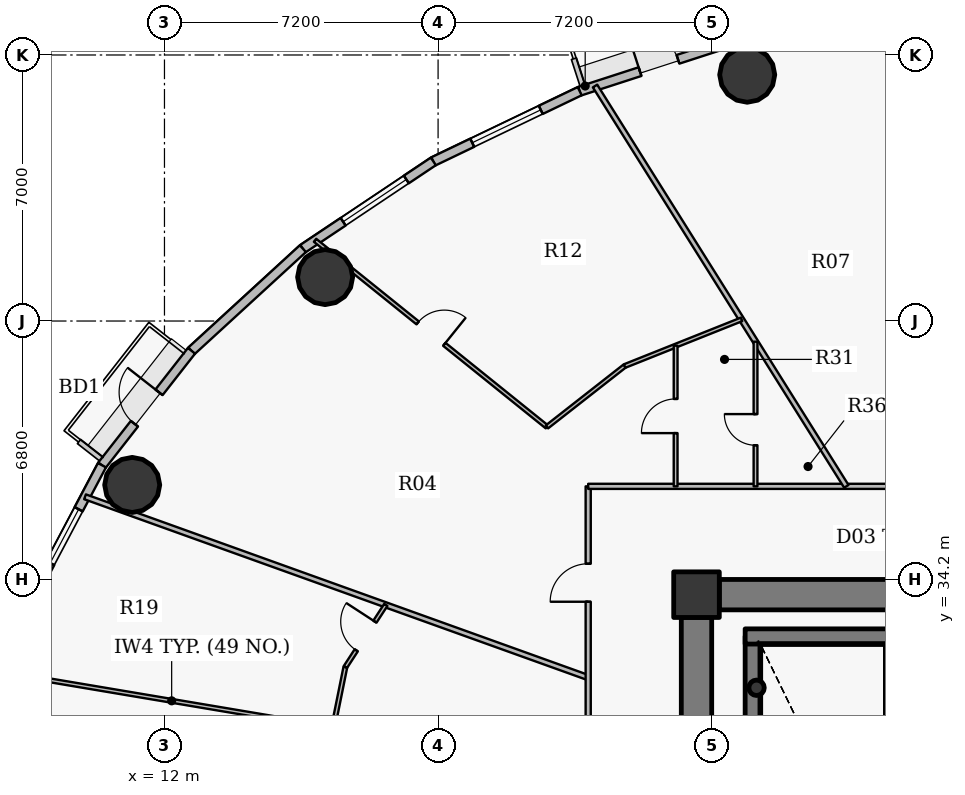
"""IFC4 building model, lengths in metres.
Left out: names, types, materials, properties, quantities, classifications, styles, units other than length and angle.
Written with IfcOpenShell. Run it as: python <this file> out.ifc"""

import sys

from ifc_helpers import new_model, si_unit, direction, frame, frame_2d, origin, origin_2d, place, context, subcontext, project, spatial, rectangle, hollow_circle, extrude, source, transform, mapped, element, fill, save


model = new_model("IFC4")
c1 = context("Model", 3, precision=1e-05, world=origin(), true_north=direction((0.0, 1.0)))
c2 = subcontext(c1, "Body", "Model", "MODEL_VIEW")
j1 = project(units=[si_unit("LENGTHUNIT", "METRE"), si_unit("PLANEANGLEUNIT", "RADIAN")], contexts=[c1])
p1 = place(None, origin())
s1 = spatial("IfcSite", under=j1, at=p1, CompositionType="ELEMENT")
p2 = place(p1, origin())
s2 = spatial("IfcBuilding", under=s1, at=p2, CompositionType="ELEMENT")
p3 = place(p2, frame((0.0, 0.0, 119.7)))
s3 = spatial("IfcBuildingStorey", under=s2, at=p3, CompositionType="ELEMENT", Elevation=119.7)
p4 = place(p3, frame((26.0, 33.8, 0.0), z_axis=(0.0, 0.0, 1.0), x_axis=(1.0, 0.0, 0.0)))
e1 = element("IfcColumn", 1, at=p4, inside=s3, PredefinedType="COLUMN", context=c2, shape_type="SweptSolid", body=[
    extrude(rectangle(XDim=1.2, YDim=1.2, at=origin_2d()), origin(), (0.0, 0.0, 1.0), 3.75),
])
p5 = place(p3, frame((27.48, 24.1, 0.0), z_axis=(0.0, 0.0, 1.0), x_axis=(0.0, 1.0, 0.0)))
e2 = element("IfcWall", 2, at=p5, inside=s3, PredefinedType="SHEAR", context=c2, shape_type="SweptSolid", body=[
    extrude(rectangle(XDim=8.6, YDim=0.4, at=frame_2d((4.3, 0.0))), origin(), (0.0, 0.0, 1.0), 3.75),
])
p6 = place(p3, frame((27.28, 32.7, 0.0), z_axis=(0.0, 0.0, 1.0), x_axis=(1.0, 0.0, 0.0)))
e3 = element("IfcWall", 3, at=p6, inside=s3, PredefinedType="SHEAR", context=c2, shape_type="SweptSolid", body=[
    extrude(rectangle(XDim=4.1, YDim=0.4, at=frame_2d((2.05, 0.0))), origin(), (0.0, 0.0, 1.0), 3.75),
])
p7 = place(p3, frame((27.58, 31.35, 0.0), z_axis=(0.0, 0.0, 1.0), x_axis=(1.0, 0.0, 0.0)))
e4 = element("IfcColumn", 4, at=p7, inside=s3, PredefinedType="COLUMN", context=c2, shape_type="SweptSolid", body=[
    extrude(hollow_circle(Radius=0.203, WallThickness=0.016, at=origin_2d()), origin(), (0.0, 0.0, 1.0), 3.75),
])
p8 = place(p3, frame((26.6, 33.8, 0.0), z_axis=(0.0, 0.0, 1.0), x_axis=(1.0, 0.0, 0.0)))
e5 = element("IfcWall", 5, at=p8, inside=s3, PredefinedType="SHEAR", context=c2, shape_type="SweptSolid", body=[
    extrude(rectangle(XDim=18.8, YDim=0.8, at=frame_2d((9.4, 0.0))), origin(), (0.0, 0.0, 1.0), 2.95),
])
p9 = place(p3, frame((26.0, 20.8, 0.0), z_axis=(0.0, 0.0, 1.0), x_axis=(0.0, 1.0, 0.0)))
e6 = element("IfcWall", 6, at=p9, inside=s3, PredefinedType="SHEAR", context=c2, shape_type="SweptSolid", body=[
    extrude(rectangle(XDim=12.4, YDim=0.8, at=frame_2d((6.2, 0.0))), origin(), (0.0, 0.0, 1.0), 2.95),
])
p10 = place(p9, frame((5.79, 0.0, 0.0)))
e7 = element("IfcOpeningElement", 7, at=p10, cuts=e6, PredefinedType="OPENING", context=c2, shape_type="SweptSolid", body=[
    extrude(rectangle(XDim=0.82, YDim=2.1, at=origin_2d()), frame((0.41, 0.41, 1.05), z_axis=(0.0, -1.0, 0.0), x_axis=(1.0, 0.0, 0.0)), (0.0, 0.0, 1.0), 0.82),
])
for number, where, z_axis, x_axis in (
    (8, (27.334, 47.481, 0.0), (0.0, 0.0, 1.0), (1.0, 0.0, 0.0)),
    (9, (16.227, 42.156, 0.0), (0.0, 0.0, 1.0), (1.0, 0.0, 0.0)),
    (10, (11.151, 36.688, 0.0), (0.0, 0.0, 1.0), (1.0, 0.0, 0.0)),
):
    element("IfcColumn", number, at=place(p3, frame(where, z_axis=z_axis, x_axis=x_axis)), inside=s3, PredefinedType="COLUMN", context=c2, shape_type="SweptSolid", body=[
        extrude(hollow_circle(Radius=0.725, WallThickness=0.042, at=origin_2d()), origin(), (0.0, 0.0, 1.0), 3.75),
    ])
p11 = place(p3, frame((22.926, 47.047, 0.0), z_axis=(0.0, 0.0, 1.0), x_axis=(0.951211346073, 0.308540070495, 0.0)))
e11 = element("IfcWall", 11, at=p11, inside=s3, PredefinedType="SOLIDWALL", context=c2, shape_type="SweptSolid", body=[
    extrude(rectangle(XDim=4.388, YDim=0.24, at=frame_2d((2.194, 0.0))), origin(), (0.0, 0.0, 1.0), 3.5),
])
p12 = place(p11, frame((1.669, 0.0, 0.0)))
e12 = element("IfcOpeningElement", 12, at=p12, cuts=e11, PredefinedType="OPENING", context=c2, shape_type="SweptSolid", body=[
    extrude(rectangle(XDim=1.05, YDim=2.15, at=origin_2d()), frame((0.525, 0.13, 1.075), z_axis=(0.0, -1.0, 0.0), x_axis=(1.0, 0.0, 0.0)), (0.0, 0.0, 1.0), 0.26),
])
p13 = place(p3, frame((19.075, 45.199, 0.0), z_axis=(0.0, 0.0, 1.0), x_axis=(0.901589935876, 0.432591709962, 0.0)))
e13 = element("IfcWall", 13, at=p13, inside=s3, PredefinedType="SOLIDWALL", context=c2, shape_type="SweptSolid", body=[
    extrude(rectangle(XDim=4.272, YDim=0.24, at=frame_2d((2.136, 0.0))), origin(), (0.0, 0.0, 1.0), 3.5),
])
p14 = place(p13, frame((1.136, 0.0, 0.9)))
e14 = element("IfcOpeningElement", 14, at=p14, cuts=e13, PredefinedType="OPENING", context=c2, shape_type="SweptSolid", body=[
    extrude(rectangle(XDim=2.0, YDim=1.75, at=origin_2d()), frame((1.0, 0.13, 0.875), z_axis=(0.0, -1.0, 0.0), x_axis=(1.0, 0.0, 0.0)), (0.0, 0.0, 1.0), 0.26),
])
p15 = place(p3, frame((15.642, 42.903, 0.0), z_axis=(0.0, 0.0, 1.0), x_axis=(0.831221811447, 0.555940914284, 0.0)))
e15 = element("IfcWall", 15, at=p15, inside=s3, PredefinedType="SOLIDWALL", context=c2, shape_type="SweptSolid", body=[
    extrude(rectangle(XDim=4.13, YDim=0.24, at=frame_2d((2.065, 0.0))), origin(), (0.0, 0.0, 1.0), 3.5),
])
p16 = place(p15, frame((1.276, 0.0, 0.9)))
e16 = element("IfcOpeningElement", 16, at=p16, cuts=e15, PredefinedType="OPENING", context=c2, shape_type="SweptSolid", body=[
    extrude(rectangle(XDim=2.0, YDim=1.75, at=origin_2d()), frame((1.0, 0.13, 0.875), z_axis=(0.0, -1.0, 0.0), x_axis=(1.0, 0.0, 0.0)), (0.0, 0.0, 1.0), 0.26),
])
p17 = place(p3, frame((12.711, 40.217, 0.0), z_axis=(0.0, 0.0, 1.0), x_axis=(0.737113356241, 0.675769117414, 0.0)))
e17 = element("IfcWall", 17, at=p17, inside=s3, PredefinedType="SOLIDWALL", context=c2, shape_type="SweptSolid", body=[
    extrude(rectangle(XDim=3.976, YDim=0.24, at=frame_2d((1.988, 0.0))), origin(), (0.0, 0.0, 1.0), 3.5),
])
p18 = place(p3, frame((10.355, 37.206, 0.0), z_axis=(0.0, 0.0, 1.0), x_axis=(0.616272103517, 0.787533297345, 0.0)))
e18 = element("IfcWall", 18, at=p18, inside=s3, PredefinedType="SOLIDWALL", context=c2, shape_type="SweptSolid", body=[
    extrude(rectangle(XDim=3.823, YDim=0.24, at=frame_2d((1.912, 0.0))), origin(), (0.0, 0.0, 1.0), 3.5),
])
p19 = place(p18, frame((1.387, 0.0, 0.0)))
e19 = element("IfcOpeningElement", 19, at=p19, cuts=e18, PredefinedType="OPENING", context=c2, shape_type="SweptSolid", body=[
    extrude(rectangle(XDim=1.05, YDim=2.15, at=origin_2d()), frame((0.525, 0.13, 1.075), z_axis=(0.0, -1.0, 0.0), x_axis=(1.0, 0.0, 0.0)), (0.0, 0.0, 1.0), 0.26),
])
p20 = place(p3, frame((8.63, 33.945, 0.0), z_axis=(0.0, 0.0, 1.0), x_axis=(0.467614004126, 0.883932770716, 0.0)))
e20 = element("IfcWall", 20, at=p20, inside=s3, PredefinedType="SOLIDWALL", context=c2, shape_type="SweptSolid", body=[
    extrude(rectangle(XDim=3.689, YDim=0.24, at=frame_2d((1.844, 0.0))), origin(), (0.0, 0.0, 1.0), 3.5),
])
p21 = place(p20, frame((0.778, 0.0, 0.9)))
e21 = element("IfcOpeningElement", 21, at=p21, cuts=e20, PredefinedType="OPENING", context=c2, shape_type="SweptSolid", body=[
    extrude(rectangle(XDim=1.6, YDim=1.75, at=origin_2d()), frame((0.8, 0.13, 0.875), z_axis=(0.0, -1.0, 0.0), x_axis=(1.0, 0.0, 0.0)), (0.0, 0.0, 1.0), 0.26),
])
p22 = place(p3, frame((7.943, 31.721, 0.0), z_axis=(0.0, 0.0, 1.0), x_axis=(0.986139151265, -0.165920385556, 0.0)))
e22 = element("IfcWall", 22, at=p22, inside=s3, PredefinedType="PARTITIONING", context=c2, shape_type="SweptSolid", body=[
    extrude(rectangle(XDim=8.612, YDim=0.1, at=frame_2d((4.306, 0.0))), origin(), (0.0, 0.0, 1.0), 2.935),
])
p23 = place(p3, frame((9.91, 36.375, 0.0), z_axis=(0.0, 0.0, 1.0), x_axis=(0.941089213164, -0.338158384292, 0.0)))
e23 = element("IfcWall", 23, at=p23, inside=s3, PredefinedType="PARTITIONING", context=c2, shape_type="SweptSolid", body=[
    extrude(rectangle(XDim=14.069, YDim=0.135, at=frame_2d((7.035, 0.0))), origin(), (0.0, 0.0, 1.0), 2.935),
])
p24 = place(p3, frame((15.945, 27.865, 0.0), z_axis=(0.0, 0.0, 1.0), x_axis=(0.198216891741, 0.980158183065, 0.0)))
e24 = element("IfcWall", 24, at=p24, inside=s3, PredefinedType="PARTITIONING", context=c2, shape_type="SweptSolid", body=[
    extrude(rectangle(XDim=4.111, YDim=0.1, at=frame_2d((2.056, 0.0))), origin(), (0.0, 0.0, 1.0), 3.5),
])
p25 = place(p3, frame((15.963, 43.124, 0.0), z_axis=(0.0, 0.0, 1.0), x_axis=(0.779083359145, -0.626920345421, 0.0)))
e25 = element("IfcWall", 25, at=p25, inside=s3, PredefinedType="PARTITIONING", context=c2, shape_type="SweptSolid", body=[
    extrude(rectangle(XDim=7.831, YDim=0.1, at=frame_2d((3.916, 0.0))), origin(), (0.0, 0.0, 1.0), 2.935),
])
p26 = place(p25, frame((3.466, 0.0, 0.0)))
e26 = element("IfcOpeningElement", 26, at=p26, cuts=e25, PredefinedType="OPENING", context=c2, shape_type="SweptSolid", body=[
    extrude(rectangle(XDim=0.9, YDim=2.1, at=origin_2d()), frame((0.45, 0.06, 1.05), z_axis=(0.0, -1.0, 0.0), x_axis=(1.0, 0.0, 0.0)), (0.0, 0.0, 1.0), 0.12),
])
p27 = place(p3, frame((16.76, 31.895, 0.0), z_axis=(0.0, 0.0, 1.0), x_axis=(0.545370803514, 0.838194897786, 0.0)))
e27 = element("IfcWall", 27, at=p27, inside=s3, PredefinedType="PARTITIONING", context=c2, shape_type="SweptSolid", body=[
    extrude(rectangle(XDim=1.952, YDim=0.1, at=frame_2d((0.976, 0.0))), origin(), (0.0, 0.0, 1.0), 3.5),
])
p28 = place(p27, frame((0.526, 0.0, 0.0)))
e28 = element("IfcOpeningElement", 28, at=p28, cuts=e27, PredefinedType="OPENING", context=c2, shape_type="SweptSolid", body=[
    extrude(rectangle(XDim=0.9, YDim=2.1, at=origin_2d()), frame((0.45, 0.06, 1.05), z_axis=(0.0, -1.0, 0.0), x_axis=(1.0, 0.0, 0.0)), (0.0, 0.0, 1.0), 0.12),
])
p29 = place(p3, frame((22.064, 38.214, 0.0), z_axis=(0.0, 0.0, 1.0), x_axis=(0.787364158956, 0.616488184146, 0.0)))
e29 = element("IfcWall", 29, at=p29, inside=s3, PredefinedType="PARTITIONING", context=c2, shape_type="SweptSolid", body=[
    extrude(rectangle(XDim=2.597, YDim=0.1, at=frame_2d((1.299, 0.0))), origin(), (0.0, 0.0, 1.0), 3.5),
])
p30 = place(p3, frame((23.15, 17.35, 0.0), z_axis=(0.0, 0.0, 1.0), x_axis=(0.0, 1.0, 0.0)))
e30 = element("IfcWall", 30, at=p30, inside=s3, PredefinedType="PARTITIONING", context=c2, shape_type="SweptSolid", body=[
    extrude(rectangle(XDim=19.3, YDim=0.135, at=frame_2d((9.65, 0.0))), origin(), (0.0, 0.0, 1.0), 2.935),
])
p31 = place(p30, frame((16.264, 0.0, 0.0)))
e31 = element("IfcOpeningElement", 31, at=p31, cuts=e30, PredefinedType="OPENING", context=c2, shape_type="SweptSolid", body=[
    extrude(rectangle(XDim=1.0, YDim=2.15, at=origin_2d()), frame((0.5, 0.078, 1.075), z_axis=(0.0, -1.0, 0.0), x_axis=(1.0, 0.0, 0.0)), (0.0, 0.0, 1.0), 0.155),
])
p32 = place(p30, frame((7.426, 0.0, 0.0)))
e32 = element("IfcOpeningElement", 32, at=p32, cuts=e30, PredefinedType="OPENING", context=c2, shape_type="SweptSolid", body=[
    extrude(rectangle(XDim=1.0, YDim=2.15, at=origin_2d()), frame((0.5, 0.078, 1.075), z_axis=(0.0, -1.0, 0.0), x_axis=(1.0, 0.0, 0.0)), (0.0, 0.0, 1.0), 0.155),
])
p33 = place(p3, frame((23.15, 36.65, 0.0), z_axis=(0.0, 0.0, 1.0), x_axis=(1.0, 0.0, 0.0)))
e33 = element("IfcWall", 33, at=p33, inside=s3, PredefinedType="PARTITIONING", context=c2, shape_type="SweptSolid", body=[
    extrude(rectangle(XDim=10.612, YDim=0.135, at=frame_2d((5.306, 0.0))), origin(), (0.0, 0.0, 1.0), 2.935),
])
p34 = place(p33, frame((8.182, 0.0, 0.0)))
e34 = element("IfcOpeningElement", 34, at=p34, cuts=e33, PredefinedType="OPENING", context=c2, shape_type="SweptSolid", body=[
    extrude(rectangle(XDim=1.0, YDim=2.15, at=origin_2d()), frame((0.5, 0.078, 1.075), z_axis=(0.0, -1.0, 0.0), x_axis=(1.0, 0.0, 0.0)), (0.0, 0.0, 1.0), 0.155),
])
p35 = place(p3, frame((23.33, 47.184, 0.0), z_axis=(0.0, 0.0, 1.0), x_axis=(0.531660079213, -0.846957826678, 0.0)))
e35 = element("IfcWall", 35, at=p35, inside=s3, PredefinedType="PARTITIONING", context=c2, shape_type="SweptSolid", body=[
    extrude(rectangle(XDim=12.437, YDim=0.135, at=frame_2d((6.219, 0.0))), origin(), (0.0, 0.0, 1.0), 2.935),
])
p36 = place(p3, frame((24.109, 39.816, 0.0), z_axis=(0.0, 0.0, 1.0), x_axis=(0.928811896505, 0.370551563092, 0.0)))
e36 = element("IfcWall", 36, at=p36, inside=s3, PredefinedType="PARTITIONING", context=c2, shape_type="SweptSolid", body=[
    extrude(rectangle(XDim=3.312, YDim=0.1, at=frame_2d((1.656, 0.0))), origin(), (0.0, 0.0, 1.0), 3.5),
])
p37 = place(p3, frame((25.451, 36.65, 0.0), z_axis=(0.0, 0.0, 1.0), x_axis=(0.0, 1.0, 0.0)))
e37 = element("IfcWall", 37, at=p37, inside=s3, PredefinedType="PARTITIONING", context=c2, shape_type="SweptSolid", body=[
    extrude(rectangle(XDim=3.701, YDim=0.1, at=frame_2d((1.851, 0.0))), origin(), (0.0, 0.0, 1.0), 3.5),
])
p38 = place(p37, frame((1.4, 0.0, 0.0)))
e38 = element("IfcOpeningElement", 38, at=p38, cuts=e37, PredefinedType="OPENING", context=c2, shape_type="SweptSolid", body=[
    extrude(rectangle(XDim=0.9, YDim=2.1, at=origin_2d()), frame((0.45, 0.06, 1.05), z_axis=(0.0, -1.0, 0.0), x_axis=(1.0, 0.0, 0.0)), (0.0, 0.0, 1.0), 0.12),
])
p39 = place(p3, frame((27.553, 36.65, 0.0), z_axis=(0.0, 0.0, 1.0), x_axis=(0.0, 1.0, 0.0)))
e39 = element("IfcWall", 39, at=p39, inside=s3, PredefinedType="PARTITIONING", context=c2, shape_type="SweptSolid", body=[
    extrude(rectangle(XDim=3.806, YDim=0.1, at=frame_2d((1.903, 0.0))), origin(), (0.0, 0.0, 1.0), 3.5),
])
p40 = place(p39, frame((1.081, 0.0, 0.0)))
e40 = element("IfcOpeningElement", 40, at=p40, cuts=e39, PredefinedType="OPENING", context=c2, shape_type="SweptSolid", body=[
    extrude(rectangle(XDim=0.82, YDim=2.1, at=origin_2d()), frame((0.41, 0.06, 1.05), z_axis=(0.0, -1.0, 0.0), x_axis=(1.0, 0.0, 0.0)), (0.0, 0.0, 1.0), 0.12),
])
p41 = place(p3, frame((30.87, 49.115, 0.0), z_axis=(0.0, 0.0, 1.0), x_axis=(0.225963524246, -0.97413576349, 0.0)))
e41 = element("IfcWall", 41, at=p41, inside=s3, PredefinedType="PARTITIONING", context=c2, shape_type="SweptSolid", body=[
    extrude(rectangle(XDim=6.895, YDim=0.1, at=frame_2d((3.448, 0.0))), origin(), (0.0, 0.0, 1.0), 2.935),
])
p42 = place(p41, frame((2.998, 0.0, 0.0)))
e42 = element("IfcOpeningElement", 42, at=p42, cuts=e41, PredefinedType="OPENING", context=c2, shape_type="SweptSolid", body=[
    extrude(rectangle(XDim=0.9, YDim=2.1, at=origin_2d()), frame((0.45, 0.06, 1.05), z_axis=(0.0, -1.0, 0.0), x_axis=(1.0, 0.0, 0.0)), (0.0, 0.0, 1.0), 0.12),
])
p43 = place(p3, frame((26.59, 34.2, 0.0), z_axis=(0.0, 0.0, 1.0), x_axis=(-1.0, 0.0, 0.0)))
e43 = element("IfcWall", 43, at=p43, inside=s3, PredefinedType="PARTITIONING", context=c2, shape_type="SweptSolid", body=[
    extrude(rectangle(XDim=0.99, YDim=0.135, at=frame_2d((0.495, 0.0))), origin(), (0.0, 0.0, 1.0), 2.935),
])
p44 = place(p3, frame((25.6, 33.893, 0.0), z_axis=(0.0, 0.0, 1.0), x_axis=(0.0, -1.0, 0.0)))
e44 = element("IfcWall", 44, at=p44, inside=s3, PredefinedType="PARTITIONING", context=c2, shape_type="SweptSolid", body=[
    extrude(rectangle(XDim=0.683, YDim=0.135, at=frame_2d((0.341, 0.0))), origin(), (0.0, 0.0, 1.0), 3.5),
])
m1 = source(origin(), c2, "Body", "SweptSolid", [
    extrude(rectangle(XDim=1.05, YDim=2.15, at=origin_2d()), frame((0.525, 0.025, 1.075), z_axis=(0.0, -1.0, 0.0), x_axis=(1.0, 0.0, 0.0)), (0.0, 0.0, 1.0), 0.05),
])
p45 = place(p12, origin())
e45 = element("IfcDoor", 45, at=p45, inside=s3, OperationType="SINGLE_SWING_LEFT", PredefinedType="DOOR", context=c2, shape_type="MappedRepresentation", body=[
    mapped(m1, transform((0.0, 0.0, 0.0), x_axis=(1.0, 0.0, 0.0), y_axis=(0.0, 1.0, 0.0), z_axis=(0.0, 0.0, 1.0), scale=1.0)),
])
fill(e12, e45)
m2 = source(origin(), c2, "Body", "SweptSolid", [
    extrude(rectangle(XDim=2.0, YDim=1.75, at=origin_2d()), frame((1.0, 0.03, 0.875), z_axis=(0.0, -1.0, 0.0), x_axis=(1.0, 0.0, 0.0)), (0.0, 0.0, 1.0), 0.06),
])
p46 = place(p14, origin())
e46 = element("IfcWindow", 46, at=p46, inside=s3, PartitioningType="DOUBLE_PANEL_VERTICAL", PredefinedType="WINDOW", context=c2, shape_type="MappedRepresentation", body=[
    mapped(m2, transform((0.0, 0.0, 0.0), x_axis=(1.0, 0.0, 0.0), y_axis=(0.0, 1.0, 0.0), z_axis=(0.0, 0.0, 1.0), scale=1.0)),
])
fill(e14, e46)
p47 = place(p16, origin())
e47 = element("IfcWindow", 47, at=p47, inside=s3, PartitioningType="DOUBLE_PANEL_VERTICAL", PredefinedType="WINDOW", context=c2, shape_type="MappedRepresentation", body=[
    mapped(m2, transform((0.0, 0.0, 0.0), x_axis=(1.0, 0.0, 0.0), y_axis=(0.0, 1.0, 0.0), z_axis=(0.0, 0.0, 1.0), scale=1.0)),
])
fill(e16, e47)
p48 = place(p19, origin())
e48 = element("IfcDoor", 48, at=p48, inside=s3, OperationType="SINGLE_SWING_RIGHT", PredefinedType="DOOR", context=c2, shape_type="MappedRepresentation", body=[
    mapped(m1, transform((0.0, 0.0, 0.0), x_axis=(1.0, 0.0, 0.0), y_axis=(0.0, 1.0, 0.0), z_axis=(0.0, 0.0, 1.0), scale=1.0)),
])
fill(e19, e48)
m3 = source(origin(), c2, "Body", "SweptSolid", [
    extrude(rectangle(XDim=1.6, YDim=1.75, at=origin_2d()), frame((0.8, 0.03, 0.875), z_axis=(0.0, -1.0, 0.0), x_axis=(1.0, 0.0, 0.0)), (0.0, 0.0, 1.0), 0.06),
])
p49 = place(p21, origin())
e49 = element("IfcWindow", 49, at=p49, inside=s3, PartitioningType="DOUBLE_PANEL_VERTICAL", PredefinedType="WINDOW", context=c2, shape_type="MappedRepresentation", body=[
    mapped(m3, transform((0.0, 0.0, 0.0), x_axis=(1.0, 0.0, 0.0), y_axis=(0.0, 1.0, 0.0), z_axis=(0.0, 0.0, 1.0), scale=1.0)),
])
fill(e21, e49)
m4 = source(origin(), c2, "Body", "SweptSolid", [
    extrude(rectangle(XDim=1.0, YDim=2.15, at=origin_2d()), frame((0.5, 0.025, 1.075), z_axis=(0.0, -1.0, 0.0), x_axis=(1.0, 0.0, 0.0)), (0.0, 0.0, 1.0), 0.05),
])
p50 = place(p31, origin())
e50 = element("IfcDoor", 50, at=p50, inside=s3, OperationType="SINGLE_SWING_LEFT", PredefinedType="DOOR", context=c2, shape_type="MappedRepresentation", body=[
    mapped(m4, transform((0.0, 0.0, 0.0), x_axis=(1.0, 0.0, 0.0), y_axis=(0.0, 1.0, 0.0), z_axis=(0.0, 0.0, 1.0), scale=1.0)),
])
fill(e31, e50)
m5 = source(origin(), c2, "Body", "SweptSolid", [
    extrude(rectangle(XDim=0.9, YDim=2.1, at=origin_2d()), frame((0.45, 0.025, 1.05), z_axis=(0.0, -1.0, 0.0), x_axis=(1.0, 0.0, 0.0)), (0.0, 0.0, 1.0), 0.05),
])
p51 = place(p26, origin())
e51 = element("IfcDoor", 51, at=p51, inside=s3, OperationType="SINGLE_SWING_RIGHT", PredefinedType="DOOR", context=c2, shape_type="MappedRepresentation", body=[
    mapped(m5, transform((0.0, 0.0, 0.0), x_axis=(1.0, 0.0, 0.0), y_axis=(0.0, 1.0, 0.0), z_axis=(0.0, 0.0, 1.0), scale=1.0)),
])
fill(e26, e51)
p52 = place(p38, origin())
e52 = element("IfcDoor", 52, at=p52, inside=s3, OperationType="SINGLE_SWING_LEFT", PredefinedType="DOOR", context=c2, shape_type="MappedRepresentation", body=[
    mapped(m5, transform((0.0, 0.0, 0.0), x_axis=(1.0, 0.0, 0.0), y_axis=(0.0, 1.0, 0.0), z_axis=(0.0, 0.0, 1.0), scale=1.0)),
])
fill(e38, e52)
m6 = source(origin(), c2, "Body", "SweptSolid", [
    extrude(rectangle(XDim=0.82, YDim=2.1, at=origin_2d()), frame((0.41, 0.025, 1.05), z_axis=(0.0, -1.0, 0.0), x_axis=(1.0, 0.0, 0.0)), (0.0, 0.0, 1.0), 0.05),
])
p53 = place(p40, origin())
e53 = element("IfcDoor", 53, at=p53, inside=s3, OperationType="SINGLE_SWING_RIGHT", PredefinedType="DOOR", context=c2, shape_type="MappedRepresentation", body=[
    mapped(m6, transform((0.0, 0.0, 0.0), x_axis=(1.0, 0.0, 0.0), y_axis=(0.0, 1.0, 0.0), z_axis=(0.0, 0.0, 1.0), scale=1.0)),
])
fill(e40, e53)
p54 = place(p28, origin())
e54 = element("IfcDoor", 54, at=p54, inside=s3, OperationType="SINGLE_SWING_RIGHT", PredefinedType="DOOR", context=c2, shape_type="MappedRepresentation", body=[
    mapped(m5, transform((0.0, 0.0, 0.0), x_axis=(1.0, 0.0, 0.0), y_axis=(0.0, 1.0, 0.0), z_axis=(0.0, 0.0, 1.0), scale=1.0)),
])
fill(e28, e54)
save(model, sys.argv[1])
